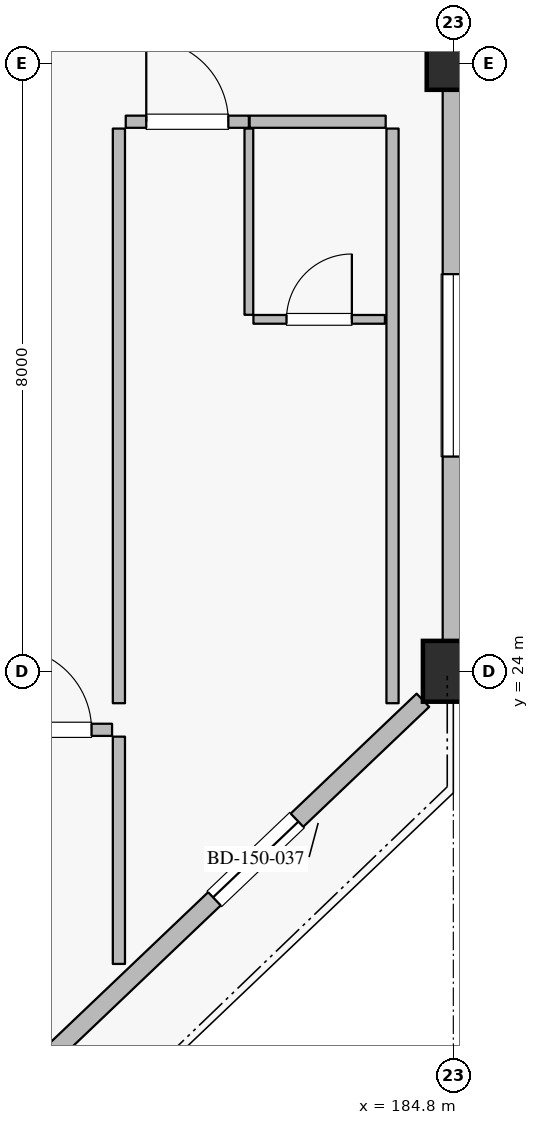
"""IFC4 building model, lengths in metres.
Left out: names, types, materials, properties, quantities, classifications, styles, units other than length and angle.
Written with IfcOpenShell. Run it as: python <this file> out.ifc"""

import sys

from ifc_helpers import new_model, si_unit, direction, frame, frame_2d, origin, origin_2d, place, context, subcontext, project, spatial, rectangle, extrude, element, fill, save


model = new_model("IFC4")
c1 = context("Model", 3, precision=1e-05, world=origin(), true_north=direction((0.0, 1.0)))
c2 = subcontext(c1, "Body", "Model", "MODEL_VIEW")
j1 = project(units=[si_unit("LENGTHUNIT", "METRE"), si_unit("PLANEANGLEUNIT", "RADIAN")], contexts=[c1])
p1 = place(None, origin())
s1 = spatial("IfcSite", under=j1, at=p1, CompositionType="ELEMENT")
p2 = place(p1, origin())
s2 = spatial("IfcBuilding", under=s1, at=p2, CompositionType="ELEMENT")
p3 = place(p2, frame((0.0, 0.0, 21.0)))
s3 = spatial("IfcBuildingStorey", under=s2, at=p3, CompositionType="ELEMENT", Elevation=21.0)
p4 = place(p3, frame((184.8, 24.0, 0.0), z_axis=(0.0, 0.0, 1.0), x_axis=(1.0, 0.0, 0.0)))
e1 = element("IfcColumn", 1, at=p4, inside=s3, PredefinedType="COLUMN", context=c2, shape_type="SweptSolid", body=[
    extrude(rectangle(XDim=0.8, YDim=0.8, at=origin_2d()), origin(), (0.0, 0.0, 1.0), 4.2),
])
p5 = place(p3, frame((184.8, 32.0, 0.0), z_axis=(0.0, 0.0, 1.0), x_axis=(1.0, 0.0, 0.0)))
e2 = element("IfcColumn", 2, at=p5, inside=s3, PredefinedType="COLUMN", context=c2, shape_type="SweptSolid", body=[
    extrude(rectangle(XDim=0.7, YDim=0.7, at=origin_2d()), origin(), (0.0, 0.0, 1.0), 4.2),
])
p6 = place(p3, frame((184.4, 23.619, 0.0), z_axis=(0.0, 0.0, 1.0), x_axis=(-0.724145676014, -0.689647040094, 0.0)))
e3 = element("IfcWall", 3, at=p6, inside=s3, PredefinedType="SOLIDWALL", context=c2, shape_type="SweptSolid", body=[
    extrude(rectangle(XDim=10.495, YDim=0.24, at=frame_2d((5.248, 0.0))), origin(), (0.0, 0.0, 1.0), 3.53),
])
p7 = place(p6, frame((2.288, 0.0, 0.0)))
e4 = element("IfcOpeningElement", 4, at=p7, cuts=e3, PredefinedType="OPENING", context=c2, shape_type="SweptSolid", body=[
    extrude(rectangle(XDim=1.5, YDim=2.25, at=frame_2d((0.75, 1.125))), frame((0.0, 0.13, 0.0), z_axis=(0.0, -1.0, 0.0), x_axis=(1.0, 0.0, 0.0)), (0.0, 0.0, 1.0), 0.26),
])
p8 = place(p6, frame((7.009, 0.0, 0.8)))
e5 = element("IfcOpeningElement", 5, at=p8, cuts=e3, PredefinedType="OPENING", context=c2, shape_type="SweptSolid", body=[
    extrude(rectangle(XDim=2.0, YDim=1.75, at=frame_2d((1.0, 0.875))), frame((0.0, 0.13, 0.0), z_axis=(0.0, -1.0, 0.0), x_axis=(1.0, 0.0, 0.0)), (0.0, 0.0, 1.0), 0.26),
])
p9 = place(p3, frame((184.8, 31.65, 0.0), z_axis=(0.0, 0.0, 1.0), x_axis=(0.0, -1.0, 0.0)))
e6 = element("IfcWall", 6, at=p9, inside=s3, PredefinedType="SOLIDWALL", context=c2, shape_type="SweptSolid", body=[
    extrude(rectangle(XDim=7.25, YDim=0.28, at=frame_2d((3.625, 0.0))), origin(), (0.0, 0.0, 1.0), 3.3),
])
p10 = place(p9, frame((2.425, 0.0, 0.75)))
e7 = element("IfcOpeningElement", 7, at=p10, cuts=e6, PredefinedType="OPENING", context=c2, shape_type="SweptSolid", body=[
    extrude(rectangle(XDim=2.4, YDim=1.65, at=frame_2d((1.2, 0.825))), frame((0.0, 0.15, 0.0), z_axis=(0.0, -1.0, 0.0), x_axis=(1.0, 0.0, 0.0)), (0.0, 0.0, 1.0), 0.3),
])
p11 = place(p3, frame((178.69, 23.23, 0.0), z_axis=(0.0, 0.0, 1.0), x_axis=(1.0, 0.0, 0.0)))
e8 = element("IfcWall", 8, at=p11, inside=s3, PredefinedType="PARTITIONING", context=c2, shape_type="SweptSolid", body=[
    extrude(rectangle(XDim=1.62, YDim=0.16, at=frame_2d((0.81, 0.0))), origin(), (0.0, 0.0, 1.0), 3.965),
])
p12 = place(p11, frame((0.27, 0.0, 0.0)))
e9 = element("IfcOpeningElement", 9, at=p12, cuts=e8, PredefinedType="OPENING", context=c2, shape_type="SweptSolid", body=[
    extrude(rectangle(XDim=1.08, YDim=2.3, at=frame_2d((0.54, 1.15))), frame((0.0, 0.09, 0.0), z_axis=(0.0, -1.0, 0.0), x_axis=(1.0, 0.0, 0.0)), (0.0, 0.0, 1.0), 0.18),
])
p13 = place(p3, frame((180.4, 20.15, 0.0), z_axis=(0.0, 0.0, 1.0), x_axis=(0.0, 1.0, 0.0)))
e10 = element("IfcWall", 10, at=p13, inside=s3, PredefinedType="PARTITIONING", context=c2, shape_type="SweptSolid", body=[
    extrude(rectangle(XDim=2.99, YDim=0.16, at=frame_2d((1.495, 0.0))), origin(), (0.0, 0.0, 1.0), 3.965),
])
p14 = place(p3, frame((180.49, 31.23, 0.0), z_axis=(0.0, 0.0, 1.0), x_axis=(1.0, 0.0, 0.0)))
e11 = element("IfcWall", 11, at=p14, inside=s3, PredefinedType="PARTITIONING", context=c2, shape_type="SweptSolid", body=[
    extrude(rectangle(XDim=1.62, YDim=0.16, at=frame_2d((0.81, 0.0))), origin(), (0.0, 0.0, 1.0), 3.965),
])
p15 = place(p14, frame((0.27, 0.0, 0.0)))
e12 = element("IfcOpeningElement", 12, at=p15, cuts=e11, PredefinedType="OPENING", context=c2, shape_type="SweptSolid", body=[
    extrude(rectangle(XDim=1.08, YDim=2.3, at=frame_2d((0.54, 1.15))), frame((0.0, 0.09, 0.0), z_axis=(0.0, -1.0, 0.0), x_axis=(1.0, 0.0, 0.0)), (0.0, 0.0, 1.0), 0.18),
])
p16 = place(p3, frame((182.12, 31.23, 0.0), z_axis=(0.0, 0.0, 1.0), x_axis=(1.0, 0.0, 0.0)))
e13 = element("IfcWall", 13, at=p16, inside=s3, PredefinedType="PARTITIONING", context=c2, shape_type="SweptSolid", body=[
    extrude(rectangle(XDim=1.79, YDim=0.16, at=frame_2d((0.895, 0.0))), origin(), (0.0, 0.0, 1.0), 3.965),
])
p17 = place(p3, frame((182.11, 28.69, 0.0), z_axis=(0.0, 0.0, 1.0), x_axis=(0.0, 1.0, 0.0)))
e14 = element("IfcWall", 14, at=p17, inside=s3, PredefinedType="PARTITIONING", context=c2, shape_type="SweptSolid", body=[
    extrude(rectangle(XDim=2.45, YDim=0.115, at=frame_2d((1.225, 0.0))), origin(), (0.0, 0.0, 1.0), 3.965),
])
p18 = place(p3, frame((182.17, 28.63, 0.0), z_axis=(0.0, 0.0, 1.0), x_axis=(1.0, 0.0, 0.0)))
e15 = element("IfcWall", 15, at=p18, inside=s3, PredefinedType="PARTITIONING", context=c2, shape_type="SweptSolid", body=[
    extrude(rectangle(XDim=1.73, YDim=0.115, at=frame_2d((0.865, 0.0))), origin(), (0.0, 0.0, 1.0), 3.965),
])
p19 = place(p18, frame((0.435, 0.0, 0.0)))
e16 = element("IfcOpeningElement", 16, at=p19, cuts=e15, PredefinedType="OPENING", context=c2, shape_type="SweptSolid", body=[
    extrude(rectangle(XDim=0.86, YDim=2.12, at=frame_2d((0.43, 1.06))), frame((0.0, 0.067, 0.0), z_axis=(0.0, -1.0, 0.0), x_axis=(1.0, 0.0, 0.0)), (0.0, 0.0, 1.0), 0.135),
])
for number, where, z_axis, x_axis in (
    (17, (180.4, 23.58, 0.0), (0.0, 0.0, 1.0), (0.0, 1.0, 0.0)),
    (18, (184.0, 23.58, 0.0), (0.0, 0.0, 1.0), (0.0, 1.0, 0.0)),
):
    element("IfcWall", number, at=place(p3, frame(where, z_axis=z_axis, x_axis=x_axis)), inside=s3, PredefinedType="PARTITIONING", context=c2, shape_type="SweptSolid", body=[
        extrude(rectangle(XDim=7.56, YDim=0.16, at=frame_2d((3.78, 0.0))), origin(), (0.0, 0.0, 1.0), 3.965),
    ])
p20 = place(p7, origin())
e19 = element("IfcDoor", 19, at=p20, inside=s3, OperationType="SLIDING_TO_LEFT", PredefinedType="DOOR", context=c2, shape_type="SweptSolid", body=[
    extrude(rectangle(XDim=1.5, YDim=2.25, at=frame_2d((0.75, 1.125))), frame((0.0, 0.025, 0.0), z_axis=(0.0, -1.0, 0.0), x_axis=(1.0, 0.0, 0.0)), (0.0, 0.0, 1.0), 0.05),
])
fill(e4, e19)
p21 = place(p10, origin())
e20 = element("IfcWindow", 20, at=p21, inside=s3, PartitioningType="DOUBLE_PANEL_VERTICAL", PredefinedType="WINDOW", context=c2, shape_type="SweptSolid", body=[
    extrude(rectangle(XDim=2.4, YDim=1.65, at=frame_2d((1.2, 0.825))), frame((0.0, 0.03, 0.0), z_axis=(0.0, -1.0, 0.0), x_axis=(1.0, 0.0, 0.0)), (0.0, 0.0, 1.0), 0.06),
])
fill(e7, e20)
p22 = place(p12, origin())
e21 = element("IfcDoor", 21, at=p22, inside=s3, OperationType="SINGLE_SWING_LEFT", PredefinedType="DOOR", context=c2, shape_type="SweptSolid", body=[
    extrude(rectangle(XDim=1.08, YDim=2.3, at=frame_2d((0.54, 1.15))), frame((0.0, 0.025, 0.0), z_axis=(0.0, -1.0, 0.0), x_axis=(1.0, 0.0, 0.0)), (0.0, 0.0, 1.0), 0.05),
])
fill(e9, e21)
p23 = place(p15, origin())
e22 = element("IfcDoor", 22, at=p23, inside=s3, OperationType="SINGLE_SWING_LEFT", PredefinedType="DOOR", context=c2, shape_type="SweptSolid", body=[
    extrude(rectangle(XDim=1.08, YDim=2.3, at=frame_2d((0.54, 1.15))), frame((0.0, 0.025, 0.0), z_axis=(0.0, -1.0, 0.0), x_axis=(1.0, 0.0, 0.0)), (0.0, 0.0, 1.0), 0.05),
])
fill(e12, e22)
p24 = place(p19, origin())
e23 = element("IfcDoor", 23, at=p24, inside=s3, OperationType="SINGLE_SWING_RIGHT", PredefinedType="DOOR", context=c2, shape_type="SweptSolid", body=[
    extrude(rectangle(XDim=0.86, YDim=2.12, at=frame_2d((0.43, 1.06))), frame((0.0, 0.025, 0.0), z_axis=(0.0, -1.0, 0.0), x_axis=(1.0, 0.0, 0.0)), (0.0, 0.0, 1.0), 0.05),
])
fill(e16, e23)
save(model, sys.argv[1])
